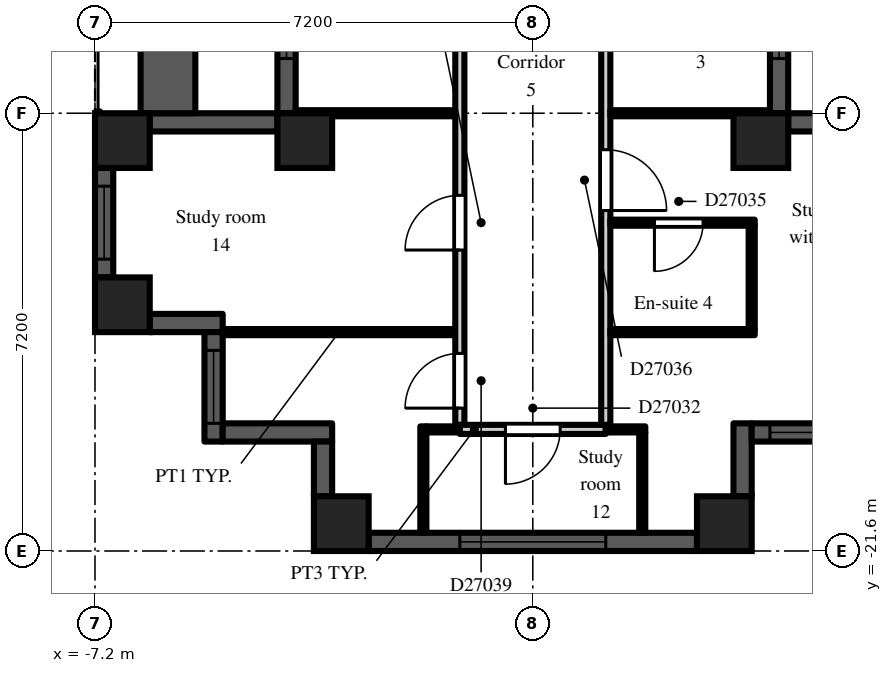
"""IFC4 building model, lengths in metres.
Left out: names, types, materials, properties, quantities, classifications, styles, units other than length and angle.
Written with IfcOpenShell. Run it as: python <this file> out.ifc"""

import sys

from ifc_helpers import new_model, si_unit, direction, frame, frame_2d, origin, origin_2d, place, context, subcontext, project, spatial, rectangle, extrude, element, fill, save


model = new_model("IFC4")
c1 = context("Model", 3, precision=1e-05, world=origin(), true_north=direction((0.0, 1.0)))
c2 = subcontext(c1, "Body", "Model", "MODEL_VIEW")
j1 = project(units=[si_unit("LENGTHUNIT", "METRE"), si_unit("PLANEANGLEUNIT", "RADIAN")], contexts=[c1])
p1 = place(None, origin())
s1 = spatial("IfcSite", under=j1, at=p1, CompositionType="ELEMENT")
p2 = place(p1, origin())
s2 = spatial("IfcBuilding", under=s1, at=p2, CompositionType="ELEMENT")
p3 = place(p2, frame((0.0, 0.0, 188.7)))
s3 = spatial("IfcBuildingStorey", under=s2, at=p3, CompositionType="ELEMENT", Elevation=188.7)
for number, where, z_axis, x_axis in (
    (1, (-6.75, -17.55, 0.0), (0.0, 0.0, 1.0), (1.0, 0.0, 0.0)),
    (2, (-6.75, -14.85, 0.0), (0.0, 0.0, 1.0), (1.0, 0.0, 0.0)),
    (3, (-3.75, -14.85, 0.0), (0.0, 0.0, 1.0), (1.0, 0.0, 0.0)),
    (4, (-3.15, -21.15, 0.0), (0.0, 0.0, 1.0), (1.0, 0.0, 0.0)),
    (5, (3.15, -21.15, 0.0), (0.0, 0.0, 1.0), (1.0, 0.0, 0.0)),
    (6, (3.75, -14.85, 0.0), (0.0, 0.0, 1.0), (1.0, 0.0, 0.0)),
):
    element("IfcColumn", number, at=place(p3, frame(where, z_axis=z_axis, x_axis=x_axis)), inside=s3, PredefinedType="COLUMN", context=c2, shape_type="SweptSolid", body=[
        extrude(rectangle(XDim=0.9, YDim=0.9, at=origin_2d()), origin(), (0.0, 0.0, 1.0), 3.0),
    ])
p4 = place(p3, frame((-4.05, -7.2, 0.0), z_axis=(0.0, 0.0, 1.0), x_axis=(0.0, -1.0, 0.0)))
e7 = element("IfcWall", 7, at=p4, inside=s3, PredefinedType="SOLIDWALL", context=c2, shape_type="SweptSolid", body=[
    extrude(rectangle(XDim=7.2, YDim=0.3, at=frame_2d((3.6, 0.0))), origin(), (0.0, 0.0, 1.0), 2.2),
])
p5 = place(p4, frame((3.0, 0.0, 0.0)))
e8 = element("IfcOpeningElement", 8, at=p5, cuts=e7, PredefinedType="OPENING", context=c2, shape_type="SweptSolid", body=[
    extrude(rectangle(XDim=1.2, YDim=2.05, at=frame_2d((0.6, 1.025))), frame((0.0, 0.16, 0.0), z_axis=(0.0, -1.0, 0.0), x_axis=(1.0, 0.0, 0.0)), (0.0, 0.0, 1.0), 0.32),
])
p6 = place(p4, frame((0.9, 0.0, 0.2)))
e9 = element("IfcOpeningElement", 9, at=p6, cuts=e7, PredefinedType="OPENING", context=c2, shape_type="SweptSolid", body=[
    extrude(rectangle(XDim=1.8, YDim=1.85, at=frame_2d((0.9, 0.925))), frame((0.0, 0.16, 0.0), z_axis=(0.0, -1.0, 0.0), x_axis=(1.0, 0.0, 0.0)), (0.0, 0.0, 1.0), 0.32),
])
p7 = place(p4, frame((4.5, 0.0, 0.2)))
e10 = element("IfcOpeningElement", 10, at=p7, cuts=e7, PredefinedType="OPENING", context=c2, shape_type="SweptSolid", body=[
    extrude(rectangle(XDim=1.8, YDim=1.85, at=frame_2d((0.9, 0.925))), frame((0.0, 0.16, 0.0), z_axis=(0.0, -1.0, 0.0), x_axis=(1.0, 0.0, 0.0)), (0.0, 0.0, 1.0), 0.32),
])
p8 = place(p3, frame((-4.2, -14.55, 0.0), z_axis=(0.0, 0.0, 1.0), x_axis=(-1.0, 0.0, 0.0)))
e11 = element("IfcWall", 11, at=p8, inside=s3, PredefinedType="SOLIDWALL", context=c2, shape_type="SweptSolid", body=[
    extrude(rectangle(XDim=2.1, YDim=0.3, at=frame_2d((1.05, 0.0))), origin(), (0.0, 0.0, 1.0), 2.2),
])
p9 = place(p3, frame((-7.05, -15.3, 0.0), z_axis=(0.0, 0.0, 1.0), x_axis=(0.0, -1.0, 0.0)))
e12 = element("IfcWall", 12, at=p9, inside=s3, PredefinedType="SOLIDWALL", context=c2, shape_type="SweptSolid", body=[
    extrude(rectangle(XDim=1.8, YDim=0.3, at=frame_2d((0.9, 0.0))), origin(), (0.0, 0.0, 1.0), 2.2),
])
p10 = place(p9, frame((0.3, 0.0, 0.2)))
e13 = element("IfcOpeningElement", 13, at=p10, cuts=e12, PredefinedType="OPENING", context=c2, shape_type="SweptSolid", body=[
    extrude(rectangle(XDim=1.2, YDim=1.85, at=frame_2d((0.6, 0.925))), frame((0.0, 0.16, 0.0), z_axis=(0.0, -1.0, 0.0), x_axis=(1.0, 0.0, 0.0)), (0.0, 0.0, 1.0), 0.32),
])
p11 = place(p3, frame((-6.3, -17.85, 0.0), z_axis=(0.0, 0.0, 1.0), x_axis=(1.0, 0.0, 0.0)))
e14 = element("IfcWall", 14, at=p11, inside=s3, PredefinedType="SOLIDWALL", context=c2, shape_type="SweptSolid", body=[
    extrude(rectangle(XDim=1.2, YDim=0.3, at=frame_2d((0.6, 0.0))), origin(), (0.0, 0.0, 1.0), 2.6),
])
p12 = place(p3, frame((-5.25, -18.0, 0.0), z_axis=(0.0, 0.0, 1.0), x_axis=(0.0, -1.0, 0.0)))
e15 = element("IfcWall", 15, at=p12, inside=s3, PredefinedType="SOLIDWALL", context=c2, shape_type="SweptSolid", body=[
    extrude(rectangle(XDim=1.8, YDim=0.3, at=frame_2d((0.9, 0.0))), origin(), (0.0, 0.0, 1.0), 2.6),
])
p13 = place(p12, frame((0.3, 0.0, 0.2)))
e16 = element("IfcOpeningElement", 16, at=p13, cuts=e15, PredefinedType="OPENING", context=c2, shape_type="SweptSolid", body=[
    extrude(rectangle(XDim=1.2, YDim=1.85, at=frame_2d((0.6, 0.925))), frame((0.0, 0.16, 0.0), z_axis=(0.0, -1.0, 0.0), x_axis=(1.0, 0.0, 0.0)), (0.0, 0.0, 1.0), 0.32),
])
p14 = place(p3, frame((-5.1, -19.65, 0.0), z_axis=(0.0, 0.0, 1.0), x_axis=(1.0, 0.0, 0.0)))
e17 = element("IfcWall", 17, at=p14, inside=s3, PredefinedType="SOLIDWALL", context=c2, shape_type="SweptSolid", body=[
    extrude(rectangle(XDim=1.8, YDim=0.3, at=frame_2d((0.9, 0.0))), origin(), (0.0, 0.0, 1.0), 2.6),
])
p15 = place(p3, frame((-3.45, -19.8, 0.0), z_axis=(0.0, 0.0, 1.0), x_axis=(0.0, -1.0, 0.0)))
e18 = element("IfcWall", 18, at=p15, inside=s3, PredefinedType="SOLIDWALL", context=c2, shape_type="SweptSolid", body=[
    extrude(rectangle(XDim=0.9, YDim=0.3, at=frame_2d((0.45, 0.0))), origin(), (0.0, 0.0, 1.0), 2.6),
])
p16 = place(p3, frame((-2.7, -21.45, 0.0), z_axis=(0.0, 0.0, 1.0), x_axis=(1.0, 0.0, 0.0)))
e19 = element("IfcWall", 19, at=p16, inside=s3, PredefinedType="SOLIDWALL", context=c2, shape_type="SweptSolid", body=[
    extrude(rectangle(XDim=5.4, YDim=0.3, at=frame_2d((2.7, 0.0))), origin(), (0.0, 0.0, 1.0), 2.2),
])
p17 = place(p16, frame((1.5, 0.0, 0.2)))
e20 = element("IfcOpeningElement", 20, at=p17, cuts=e19, PredefinedType="OPENING", context=c2, shape_type="SweptSolid", body=[
    extrude(rectangle(XDim=2.4, YDim=1.85, at=frame_2d((1.2, 0.925))), frame((0.0, 0.16, 0.0), z_axis=(0.0, -1.0, 0.0), x_axis=(1.0, 0.0, 0.0)), (0.0, 0.0, 1.0), 0.32),
])
p18 = place(p3, frame((3.45, -20.7, 0.0), z_axis=(0.0, 0.0, 1.0), x_axis=(0.0, 1.0, 0.0)))
e21 = element("IfcWall", 21, at=p18, inside=s3, PredefinedType="SOLIDWALL", context=c2, shape_type="SweptSolid", body=[
    extrude(rectangle(XDim=1.2, YDim=0.3, at=frame_2d((0.6, 0.0))), origin(), (0.0, 0.0, 1.0), 2.6),
])
p19 = place(p3, frame((3.6, -19.65, 0.0), z_axis=(0.0, 0.0, 1.0), x_axis=(1.0, 0.0, 0.0)))
e22 = element("IfcWall", 22, at=p19, inside=s3, PredefinedType="SOLIDWALL", context=c2, shape_type="SweptSolid", body=[
    extrude(rectangle(XDim=1.8, YDim=0.3, at=frame_2d((0.9, 0.0))), origin(), (0.0, 0.0, 1.0), 2.6),
])
p20 = place(p19, frame((0.3, 0.0, 0.2)))
e23 = element("IfcOpeningElement", 23, at=p20, cuts=e22, PredefinedType="OPENING", context=c2, shape_type="SweptSolid", body=[
    extrude(rectangle(XDim=1.2, YDim=1.85, at=frame_2d((0.6, 0.925))), frame((0.0, 0.16, 0.0), z_axis=(0.0, -1.0, 0.0), x_axis=(1.0, 0.0, 0.0)), (0.0, 0.0, 1.0), 0.32),
])
p21 = place(p3, frame((6.3, -14.55, 0.0), z_axis=(0.0, 0.0, 1.0), x_axis=(-1.0, 0.0, 0.0)))
e24 = element("IfcWall", 24, at=p21, inside=s3, PredefinedType="SOLIDWALL", context=c2, shape_type="SweptSolid", body=[
    extrude(rectangle(XDim=2.1, YDim=0.3, at=frame_2d((1.05, 0.0))), origin(), (0.0, 0.0, 1.0), 2.2),
])
p22 = place(p3, frame((4.05, -14.4, 0.0), z_axis=(0.0, 0.0, 1.0), x_axis=(0.0, 1.0, 0.0)))
e25 = element("IfcWall", 25, at=p22, inside=s3, PredefinedType="SOLIDWALL", context=c2, shape_type="SweptSolid", body=[
    extrude(rectangle(XDim=7.2, YDim=0.3, at=frame_2d((3.6, 0.0))), origin(), (0.0, 0.0, 1.0), 2.2),
])
p23 = place(p22, frame((3.0, 0.0, 0.0)))
e26 = element("IfcOpeningElement", 26, at=p23, cuts=e25, PredefinedType="OPENING", context=c2, shape_type="SweptSolid", body=[
    extrude(rectangle(XDim=1.2, YDim=2.05, at=frame_2d((0.6, 1.025))), frame((0.0, 0.16, 0.0), z_axis=(0.0, -1.0, 0.0), x_axis=(1.0, 0.0, 0.0)), (0.0, 0.0, 1.0), 0.32),
])
p24 = place(p22, frame((0.9, 0.0, 0.2)))
e27 = element("IfcOpeningElement", 27, at=p24, cuts=e25, PredefinedType="OPENING", context=c2, shape_type="SweptSolid", body=[
    extrude(rectangle(XDim=1.8, YDim=1.85, at=frame_2d((0.9, 0.925))), frame((0.0, 0.16, 0.0), z_axis=(0.0, -1.0, 0.0), x_axis=(1.0, 0.0, 0.0)), (0.0, 0.0, 1.0), 0.32),
])
p25 = place(p22, frame((4.5, 0.0, 0.2)))
e28 = element("IfcOpeningElement", 28, at=p25, cuts=e25, PredefinedType="OPENING", context=c2, shape_type="SweptSolid", body=[
    extrude(rectangle(XDim=1.8, YDim=1.85, at=frame_2d((0.9, 0.925))), frame((0.0, 0.16, 0.0), z_axis=(0.0, -1.0, 0.0), x_axis=(1.0, 0.0, 0.0)), (0.0, 0.0, 1.0), 0.32),
])
p26 = place(p3, frame((-6.0, -14.4, 0.0), z_axis=(0.0, 0.0, 1.0), x_axis=(0.0, 1.0, 0.0)))
e29 = element("IfcWall", 29, at=p26, inside=s3, PredefinedType="PARAPET", context=c2, shape_type="SweptSolid", body=[
    extrude(rectangle(XDim=7.2, YDim=0.9, at=frame_2d((3.6, 0.0))), origin(), (0.0, 0.0, 1.0), 0.8),
])
p27 = place(p3, frame((-5.1, -18.0, 0.0), z_axis=(0.0, 0.0, 1.0), x_axis=(1.0, 0.0, 0.0)))
e30 = element("IfcWall", 30, at=p27, inside=s3, PredefinedType="PARTITIONING", context=c2, shape_type="SweptSolid", body=[
    extrude(rectangle(XDim=3.825, YDim=0.1, at=frame_2d((1.913, 0.0))), origin(), (0.0, 0.0, 1.0), 2.6),
])
p28 = place(p3, frame((-3.9, -14.4, 0.0), z_axis=(0.0, 0.0, 1.0), x_axis=(1.0, 0.0, 0.0)))
e31 = element("IfcWall", 31, at=p28, inside=s3, PredefinedType="PARTITIONING", context=c2, shape_type="SweptSolid", body=[
    extrude(rectangle(XDim=2.625, YDim=0.1, at=frame_2d((1.312, 0.0))), origin(), (0.0, 0.0, 1.0), 2.6),
])
p29 = place(p3, frame((-1.8, -21.3, 0.0), z_axis=(0.0, 0.0, 1.0), x_axis=(0.0, 1.0, 0.0)))
e32 = element("IfcWall", 32, at=p29, inside=s3, PredefinedType="PARTITIONING", context=c2, shape_type="SweptSolid", body=[
    extrude(rectangle(XDim=1.75, YDim=0.1, at=frame_2d((0.875, 0.0))), origin(), (0.0, 0.0, 1.0), 2.6),
])
p30 = place(p3, frame((-1.75, -19.6, 0.0), z_axis=(0.0, 0.0, 1.0), x_axis=(1.0, 0.0, 0.0)))
e33 = element("IfcWall", 33, at=p30, inside=s3, PredefinedType="PARTITIONING", context=c2, shape_type="SweptSolid", body=[
    extrude(rectangle(XDim=0.55, YDim=0.1, at=frame_2d((0.275, 0.0))), origin(), (0.0, 0.0, 1.0), 2.6),
])
p31 = place(p3, frame((-1.2, -19.525, 0.0), z_axis=(0.0, 0.0, 1.0), x_axis=(0.0, 1.0, 0.0)))
e34 = element("IfcWall", 34, at=p31, inside=s3, PredefinedType="PARTITIONING", context=c2, shape_type="SweptSolid", body=[
    extrude(rectangle(XDim=18.25, YDim=0.15, at=frame_2d((9.125, 0.0))), origin(), (0.0, 0.0, 1.0), 2.6),
])
p32 = place(p31, frame((10.075, 0.0, 0.0)))
e35 = element("IfcOpeningElement", 35, at=p32, cuts=e34, PredefinedType="OPENING", context=c2, shape_type="SweptSolid", body=[
    extrude(rectangle(XDim=0.9, YDim=2.1, at=frame_2d((0.45, 1.05))), frame((0.0, 0.085, 0.0), z_axis=(0.0, -1.0, 0.0), x_axis=(1.0, 0.0, 0.0)), (0.0, 0.0, 1.0), 0.17),
])
p33 = place(p31, frame((2.875, 0.0, 0.0)))
e36 = element("IfcOpeningElement", 36, at=p33, cuts=e34, PredefinedType="OPENING", context=c2, shape_type="SweptSolid", body=[
    extrude(rectangle(XDim=0.9, YDim=2.1, at=frame_2d((0.45, 1.05))), frame((0.0, 0.085, 0.0), z_axis=(0.0, -1.0, 0.0), x_axis=(1.0, 0.0, 0.0)), (0.0, 0.0, 1.0), 0.17),
])
p34 = place(p31, frame((0.275, 0.0, 0.0)))
e37 = element("IfcOpeningElement", 37, at=p34, cuts=e34, PredefinedType="OPENING", context=c2, shape_type="SweptSolid", body=[
    extrude(rectangle(XDim=0.9, YDim=2.1, at=frame_2d((0.45, 1.05))), frame((0.0, 0.085, 0.0), z_axis=(0.0, -1.0, 0.0), x_axis=(1.0, 0.0, 0.0)), (0.0, 0.0, 1.0), 0.17),
])
p35 = place(p3, frame((-1.2, -19.6, 0.0), z_axis=(0.0, 0.0, 1.0), x_axis=(1.0, 0.0, 0.0)))
e38 = element("IfcWall", 38, at=p35, inside=s3, PredefinedType="PARTITIONING", context=c2, shape_type="SweptSolid", body=[
    extrude(rectangle(XDim=2.4, YDim=0.15, at=frame_2d((1.2, 0.0))), origin(), (0.0, 0.0, 1.0), 2.6),
])
p36 = place(p35, frame((0.75, 0.0, 0.0)))
e39 = element("IfcOpeningElement", 39, at=p36, cuts=e38, PredefinedType="OPENING", context=c2, shape_type="SweptSolid", body=[
    extrude(rectangle(XDim=0.9, YDim=2.1, at=frame_2d((0.45, 1.05))), frame((0.0, 0.085, 0.0), z_axis=(0.0, -1.0, 0.0), x_axis=(1.0, 0.0, 0.0)), (0.0, 0.0, 1.0), 0.17),
])
p37 = place(p3, frame((1.2, -19.525, 0.0), z_axis=(0.0, 0.0, 1.0), x_axis=(0.0, 1.0, 0.0)))
e40 = element("IfcWall", 40, at=p37, inside=s3, PredefinedType="PARTITIONING", context=c2, shape_type="SweptSolid", body=[
    extrude(rectangle(XDim=18.4, YDim=0.15, at=frame_2d((9.2, 0.0))), origin(), (0.0, 0.0, 1.0), 2.6),
])
p38 = place(p37, frame((14.875, 0.0, 0.0)))
e41 = element("IfcOpeningElement", 41, at=p38, cuts=e40, PredefinedType="OPENING", context=c2, shape_type="SweptSolid", body=[
    extrude(rectangle(XDim=0.9, YDim=2.1, at=frame_2d((0.45, 1.05))), frame((0.0, 0.085, 0.0), z_axis=(0.0, -1.0, 0.0), x_axis=(1.0, 0.0, 0.0)), (0.0, 0.0, 1.0), 0.17),
])
p39 = place(p37, frame((10.475, 0.0, 0.0)))
e42 = element("IfcOpeningElement", 42, at=p39, cuts=e40, PredefinedType="OPENING", context=c2, shape_type="SweptSolid", body=[
    extrude(rectangle(XDim=0.9, YDim=2.1, at=frame_2d((0.45, 1.05))), frame((0.0, 0.085, 0.0), z_axis=(0.0, -1.0, 0.0), x_axis=(1.0, 0.0, 0.0)), (0.0, 0.0, 1.0), 0.17),
])
p40 = place(p37, frame((6.875, 0.0, 0.0)))
e43 = element("IfcOpeningElement", 43, at=p40, cuts=e40, PredefinedType="OPENING", context=c2, shape_type="SweptSolid", body=[
    extrude(rectangle(XDim=0.9, YDim=2.1, at=frame_2d((0.45, 1.05))), frame((0.0, 0.085, 0.0), z_axis=(0.0, -1.0, 0.0), x_axis=(1.0, 0.0, 0.0)), (0.0, 0.0, 1.0), 0.17),
])
p41 = place(p37, frame((3.525, 0.0, 0.0)))
e44 = element("IfcOpeningElement", 44, at=p41, cuts=e40, PredefinedType="OPENING", context=c2, shape_type="SweptSolid", body=[
    extrude(rectangle(XDim=1.0, YDim=2.1, at=frame_2d((0.5, 1.05))), frame((0.0, 0.085, 0.0), z_axis=(0.0, -1.0, 0.0), x_axis=(1.0, 0.0, 0.0)), (0.0, 0.0, 1.0), 0.17),
])
p42 = place(p3, frame((1.2, -19.6, 0.0), z_axis=(0.0, 0.0, 1.0), x_axis=(1.0, 0.0, 0.0)))
e45 = element("IfcWall", 45, at=p42, inside=s3, PredefinedType="PARTITIONING", context=c2, shape_type="SweptSolid", body=[
    extrude(rectangle(XDim=0.65, YDim=0.1, at=frame_2d((0.325, 0.0))), origin(), (0.0, 0.0, 1.0), 2.6),
])
p43 = place(p3, frame((1.275, -18.0, 0.0), z_axis=(0.0, 0.0, 1.0), x_axis=(1.0, 0.0, 0.0)))
e46 = element("IfcWall", 46, at=p43, inside=s3, PredefinedType="PARTITIONING", context=c2, shape_type="SweptSolid", body=[
    extrude(rectangle(XDim=2.375, YDim=0.1, at=frame_2d((1.188, 0.0))), origin(), (0.0, 0.0, 1.0), 2.6),
])
p44 = place(p3, frame((1.275, -16.2, 0.0), z_axis=(0.0, 0.0, 1.0), x_axis=(1.0, 0.0, 0.0)))
e47 = element("IfcWall", 47, at=p44, inside=s3, PredefinedType="PARTITIONING", context=c2, shape_type="SweptSolid", body=[
    extrude(rectangle(XDim=2.375, YDim=0.1, at=frame_2d((1.188, 0.0))), origin(), (0.0, 0.0, 1.0), 2.6),
])
p45 = place(p44, frame((0.725, 0.0, 0.0)))
e48 = element("IfcOpeningElement", 48, at=p45, cuts=e47, PredefinedType="OPENING", context=c2, shape_type="SweptSolid", body=[
    extrude(rectangle(XDim=0.8, YDim=2.1, at=frame_2d((0.4, 1.05))), frame((0.0, 0.06, 0.0), z_axis=(0.0, -1.0, 0.0), x_axis=(1.0, 0.0, 0.0)), (0.0, 0.0, 1.0), 0.12),
])
p46 = place(p3, frame((1.275, -14.4, 0.0), z_axis=(0.0, 0.0, 1.0), x_axis=(1.0, 0.0, 0.0)))
e49 = element("IfcWall", 49, at=p46, inside=s3, PredefinedType="PARTITIONING", context=c2, shape_type="SweptSolid", body=[
    extrude(rectangle(XDim=2.625, YDim=0.1, at=frame_2d((1.312, 0.0))), origin(), (0.0, 0.0, 1.0), 2.6),
])
p47 = place(p3, frame((1.8, -21.3, 0.0), z_axis=(0.0, 0.0, 1.0), x_axis=(0.0, 1.0, 0.0)))
e50 = element("IfcWall", 50, at=p47, inside=s3, PredefinedType="PARTITIONING", context=c2, shape_type="SweptSolid", body=[
    extrude(rectangle(XDim=1.65, YDim=0.1, at=frame_2d((0.825, 0.0))), origin(), (0.0, 0.0, 1.0), 2.6),
])
p48 = place(p3, frame((3.6, -17.95, 0.0), z_axis=(0.0, 0.0, 1.0), x_axis=(0.0, 1.0, 0.0)))
e51 = element("IfcWall", 51, at=p48, inside=s3, PredefinedType="PARTITIONING", context=c2, shape_type="SweptSolid", body=[
    extrude(rectangle(XDim=1.7, YDim=0.1, at=frame_2d((0.85, 0.0))), origin(), (0.0, 0.0, 1.0), 2.6),
])
p49 = place(p7, origin())
e52 = element("IfcWindow", 52, at=p49, inside=s3, PartitioningType="SINGLE_PANEL", PredefinedType="WINDOW", context=c2, shape_type="SweptSolid", body=[
    extrude(rectangle(XDim=1.8, YDim=1.85, at=frame_2d((0.9, 0.925))), frame((0.0, 0.03, 0.0), z_axis=(0.0, -1.0, 0.0), x_axis=(1.0, 0.0, 0.0)), (0.0, 0.0, 1.0), 0.06),
])
fill(e10, e52)
p50 = place(p10, origin())
e53 = element("IfcWindow", 53, at=p50, inside=s3, PartitioningType="SINGLE_PANEL", PredefinedType="WINDOW", context=c2, shape_type="SweptSolid", body=[
    extrude(rectangle(XDim=1.2, YDim=1.85, at=frame_2d((0.6, 0.925))), frame((0.0, 0.03, 0.0), z_axis=(0.0, -1.0, 0.0), x_axis=(1.0, 0.0, 0.0)), (0.0, 0.0, 1.0), 0.06),
])
fill(e13, e53)
p51 = place(p13, origin())
e54 = element("IfcWindow", 54, at=p51, inside=s3, PartitioningType="SINGLE_PANEL", PredefinedType="WINDOW", context=c2, shape_type="SweptSolid", body=[
    extrude(rectangle(XDim=1.2, YDim=1.85, at=frame_2d((0.6, 0.925))), frame((0.0, 0.03, 0.0), z_axis=(0.0, -1.0, 0.0), x_axis=(1.0, 0.0, 0.0)), (0.0, 0.0, 1.0), 0.06),
])
fill(e16, e54)
p52 = place(p17, origin())
e55 = element("IfcWindow", 55, at=p52, inside=s3, PartitioningType="SINGLE_PANEL", PredefinedType="WINDOW", context=c2, shape_type="SweptSolid", body=[
    extrude(rectangle(XDim=2.4, YDim=1.85, at=frame_2d((1.2, 0.925))), frame((0.0, 0.03, 0.0), z_axis=(0.0, -1.0, 0.0), x_axis=(1.0, 0.0, 0.0)), (0.0, 0.0, 1.0), 0.06),
])
fill(e20, e55)
p53 = place(p20, origin())
e56 = element("IfcWindow", 56, at=p53, inside=s3, PartitioningType="SINGLE_PANEL", PredefinedType="WINDOW", context=c2, shape_type="SweptSolid", body=[
    extrude(rectangle(XDim=1.2, YDim=1.85, at=frame_2d((0.6, 0.925))), frame((0.0, 0.03, 0.0), z_axis=(0.0, -1.0, 0.0), x_axis=(1.0, 0.0, 0.0)), (0.0, 0.0, 1.0), 0.06),
])
fill(e23, e56)
p54 = place(p24, origin())
e57 = element("IfcWindow", 57, at=p54, inside=s3, PartitioningType="SINGLE_PANEL", PredefinedType="WINDOW", context=c2, shape_type="SweptSolid", body=[
    extrude(rectangle(XDim=1.8, YDim=1.85, at=frame_2d((0.9, 0.925))), frame((0.0, 0.03, 0.0), z_axis=(0.0, -1.0, 0.0), x_axis=(1.0, 0.0, 0.0)), (0.0, 0.0, 1.0), 0.06),
])
fill(e27, e57)
p55 = place(p36, frame((0.9, 0.0, 0.0), z_axis=(0.0, 0.0, 1.0), x_axis=(-1.0, 0.0, 0.0)))
e58 = element("IfcDoor", 58, at=p55, inside=s3, OperationType="SINGLE_SWING_RIGHT", PredefinedType="DOOR", context=c2, shape_type="SweptSolid", body=[
    extrude(rectangle(XDim=0.9, YDim=2.1, at=frame_2d((0.45, 1.05))), frame((0.0, 0.025, 0.0), z_axis=(0.0, -1.0, 0.0), x_axis=(1.0, 0.0, 0.0)), (0.0, 0.0, 1.0), 0.05),
])
fill(e39, e58)
p56 = place(p45, frame((0.8, 0.0, 0.0), z_axis=(0.0, 0.0, 1.0), x_axis=(-1.0, 0.0, 0.0)))
e59 = element("IfcDoor", 59, at=p56, inside=s3, OperationType="SINGLE_SWING_RIGHT", PredefinedType="DOOR", context=c2, shape_type="SweptSolid", body=[
    extrude(rectangle(XDim=0.8, YDim=2.1, at=frame_2d((0.4, 1.05))), frame((0.0, 0.025, 0.0), z_axis=(0.0, -1.0, 0.0), x_axis=(1.0, 0.0, 0.0)), (0.0, 0.0, 1.0), 0.05),
])
fill(e48, e59)
p57 = place(p41, frame((1.0, 0.0, 0.0), z_axis=(0.0, 0.0, 1.0), x_axis=(-1.0, 0.0, 0.0)))
e60 = element("IfcDoor", 60, at=p57, inside=s3, OperationType="SINGLE_SWING_RIGHT", PredefinedType="DOOR", context=c2, shape_type="SweptSolid", body=[
    extrude(rectangle(XDim=1.0, YDim=2.1, at=frame_2d((0.5, 1.05))), frame((0.0, 0.025, 0.0), z_axis=(0.0, -1.0, 0.0), x_axis=(1.0, 0.0, 0.0)), (0.0, 0.0, 1.0), 0.05),
])
fill(e44, e60)
p58 = place(p33, origin())
e61 = element("IfcDoor", 61, at=p58, inside=s3, OperationType="SINGLE_SWING_LEFT", PredefinedType="DOOR", context=c2, shape_type="SweptSolid", body=[
    extrude(rectangle(XDim=0.9, YDim=2.1, at=frame_2d((0.45, 1.05))), frame((0.0, 0.025, 0.0), z_axis=(0.0, -1.0, 0.0), x_axis=(1.0, 0.0, 0.0)), (0.0, 0.0, 1.0), 0.05),
])
fill(e36, e61)
p59 = place(p34, origin())
e62 = element("IfcDoor", 62, at=p59, inside=s3, OperationType="SINGLE_SWING_LEFT", PredefinedType="DOOR", context=c2, shape_type="SweptSolid", body=[
    extrude(rectangle(XDim=0.9, YDim=2.1, at=frame_2d((0.45, 1.05))), frame((0.0, 0.025, 0.0), z_axis=(0.0, -1.0, 0.0), x_axis=(1.0, 0.0, 0.0)), (0.0, 0.0, 1.0), 0.05),
])
fill(e37, e62)
save(model, sys.argv[1])
